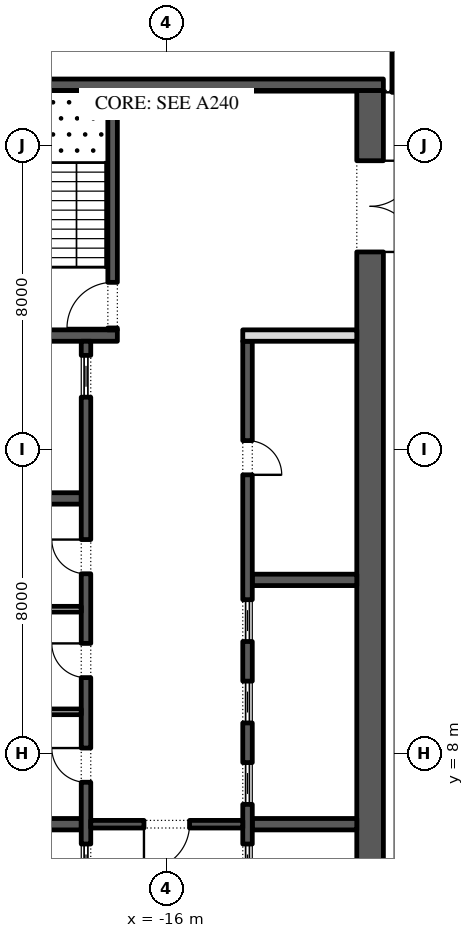
"""IFC4 building model, lengths in metres.
Left out: names, types, materials, properties, quantities, classifications, styles, units other than length and angle.
Written with IfcOpenShell. Run it as: python <this file> out.ifc"""

import sys

from ifc_helpers import new_model, si_unit, direction, frame, frame_2d, origin, place, context, subcontext, project, spatial, rectangle, extrude, element, fill, save


model = new_model("IFC4")
c1 = context("Model", 3, precision=1e-05, world=origin(), true_north=direction((0.0, 1.0)))
c2 = subcontext(c1, "Body", "Model", "MODEL_VIEW")
j1 = project(units=[si_unit("LENGTHUNIT", "METRE"), si_unit("PLANEANGLEUNIT", "RADIAN")], contexts=[c1])
p1 = place(None, origin())
s1 = spatial("IfcSite", under=j1, at=p1, CompositionType="ELEMENT")
p2 = place(p1, origin())
s2 = spatial("IfcBuilding", under=s1, at=p2, CompositionType="ELEMENT")
p3 = place(p2, frame((0.0, 0.0, 171.6)))
s3 = spatial("IfcBuildingStorey", under=s2, at=p3, CompositionType="ELEMENT", Elevation=171.6)
p4 = place(p3, frame((-10.65, -2.45, 0.0), z_axis=(0.0, 0.0, 1.0), x_axis=(0.0, 1.0, 0.0)))
e1 = element("IfcWall", 1, at=p4, inside=s3, PredefinedType="SHEAR", context=c2, shape_type="SweptSolid", body=[
    extrude(rectangle(XDim=27.9, YDim=0.7, at=frame_2d((13.95, 0.0))), origin(), (0.0, 0.0, 1.0), 4.0),
])
p5 = place(p4, frame((23.65, 0.0, 0.0)))
e2 = element("IfcOpeningElement", 2, at=p5, cuts=e1, PredefinedType="OPENING", context=c2, shape_type="SweptSolid", body=[
    extrude(rectangle(XDim=2.4, YDim=2.1, at=frame_2d((1.2, 1.05))), frame((0.0, 0.36, 0.0), z_axis=(0.0, -1.0, 0.0), x_axis=(1.0, 0.0, 0.0)), (0.0, 0.0, 1.0), 0.72),
])
p6 = place(p4, frame((1.387, 0.0, 0.0)))
e3 = element("IfcOpeningElement", 3, at=p6, cuts=e1, PredefinedType="OPENING", context=c2, shape_type="SweptSolid", body=[
    extrude(rectangle(XDim=0.9, YDim=2.1, at=frame_2d((0.45, 1.05))), frame((0.0, 0.36, 0.0), z_axis=(0.0, -1.0, 0.0), x_axis=(1.0, 0.0, 0.0)), (0.0, 0.0, 1.0), 0.72),
])
p7 = place(p4, frame((4.562, 0.0, 0.0)))
e4 = element("IfcOpeningElement", 4, at=p7, cuts=e1, PredefinedType="OPENING", context=c2, shape_type="SweptSolid", body=[
    extrude(rectangle(XDim=1.0, YDim=2.1, at=frame_2d((0.5, 1.05))), frame((0.0, 0.36, 0.0), z_axis=(0.0, -1.0, 0.0), x_axis=(1.0, 0.0, 0.0)), (0.0, 0.0, 1.0), 0.72),
])
p8 = place(p3, frame((-21.7, 25.6, 0.0), z_axis=(0.0, 0.0, 1.0), x_axis=(1.0, 0.0, 0.0)))
e5 = element("IfcWall", 5, at=p8, inside=s3, PredefinedType="SHEAR", context=c2, shape_type="SweptSolid", body=[
    extrude(rectangle(XDim=11.4, YDim=0.3, at=frame_2d((5.7, 0.0))), origin(), (0.0, 0.0, 1.0), 4.0),
])
p9 = place(p3, frame((-21.0, 19.0, 0.0), z_axis=(0.0, 0.0, 1.0), x_axis=(1.0, 0.0, 0.0)))
e6 = element("IfcWall", 6, at=p9, inside=s3, PredefinedType="SHEAR", context=c2, shape_type="SweptSolid", body=[
    extrude(rectangle(XDim=3.7, YDim=0.3, at=frame_2d((1.85, 0.0))), origin(), (0.0, 0.0, 1.0), 4.0),
])
p10 = place(p3, frame((-17.425, 19.15, 0.0), z_axis=(0.0, 0.0, 1.0), x_axis=(0.0, 1.0, 0.0)))
e7 = element("IfcWall", 7, at=p10, inside=s3, PredefinedType="SHEAR", context=c2, shape_type="SweptSolid", body=[
    extrude(rectangle(XDim=6.3, YDim=0.25, at=frame_2d((3.15, 0.0))), origin(), (0.0, 0.0, 1.0), 4.0),
])
p11 = place(p10, frame((0.05, 0.0, 0.0)))
e8 = element("IfcOpeningElement", 8, at=p11, cuts=e7, PredefinedType="OPENING", context=c2, shape_type="SweptSolid", body=[
    extrude(rectangle(XDim=1.2, YDim=2.1, at=frame_2d((0.6, 1.05))), frame((0.0, 0.135, 0.0), z_axis=(0.0, -1.0, 0.0), x_axis=(1.0, 0.0, 0.0)), (0.0, 0.0, 1.0), 0.27),
])
for number, where, z_axis, x_axis in (
    (9, (-21.0, 6.143, 0.0), (0.0, 0.0, 1.0), (1.0, 0.0, 0.0)),
    (10, (-21.0, 14.714, 0.0), (0.0, 0.0, 1.0), (1.0, 0.0, 0.0)),
):
    element("IfcWall", number, at=place(p3, frame(where, z_axis=z_axis, x_axis=x_axis)), inside=s3, PredefinedType="SHEAR", context=c2, shape_type="SweptSolid", body=[
        extrude(rectangle(XDim=2.75, YDim=0.3, at=frame_2d((1.375, 0.0))), origin(), (0.0, 0.0, 1.0), 4.0),
    ])
p12 = place(p3, frame((-18.125, 4.15, 0.0), z_axis=(0.0, 0.0, 1.0), x_axis=(0.0, 1.0, 0.0)))
e11 = element("IfcWall", 11, at=p12, inside=s3, PredefinedType="SHEAR", context=c2, shape_type="SweptSolid", body=[
    extrude(rectangle(XDim=14.7, YDim=0.25, at=frame_2d((7.35, 0.0))), origin(), (0.0, 0.0, 1.0), 4.0),
])
p13 = place(p12, frame((3.096, 0.0, 0.0)))
e12 = element("IfcOpeningElement", 12, at=p13, cuts=e11, PredefinedType="OPENING", context=c2, shape_type="SweptSolid", body=[
    extrude(rectangle(XDim=0.9, YDim=2.1, at=frame_2d((0.45, 1.05))), frame((0.0, 0.135, 0.0), z_axis=(0.0, -1.0, 0.0), x_axis=(1.0, 0.0, 0.0)), (0.0, 0.0, 1.0), 0.27),
])
p14 = place(p12, frame((5.85, 0.0, 0.0)))
e13 = element("IfcOpeningElement", 13, at=p14, cuts=e11, PredefinedType="OPENING", context=c2, shape_type="SweptSolid", body=[
    extrude(rectangle(XDim=0.9, YDim=2.1, at=frame_2d((0.45, 1.05))), frame((0.0, 0.135, 0.0), z_axis=(0.0, -1.0, 0.0), x_axis=(1.0, 0.0, 0.0)), (0.0, 0.0, 1.0), 0.27),
])
p15 = place(p12, frame((8.582, 0.0, 0.0)))
e14 = element("IfcOpeningElement", 14, at=p15, cuts=e11, PredefinedType="OPENING", context=c2, shape_type="SweptSolid", body=[
    extrude(rectangle(XDim=0.9, YDim=2.1, at=frame_2d((0.45, 1.05))), frame((0.0, 0.135, 0.0), z_axis=(0.0, -1.0, 0.0), x_axis=(1.0, 0.0, 0.0)), (0.0, 0.0, 1.0), 0.27),
])
p16 = place(p12, frame((0.371, 0.0, 0.0)))
e15 = element("IfcOpeningElement", 15, at=p16, cuts=e11, PredefinedType="OPENING", context=c2, shape_type="SweptSolid", body=[
    extrude(rectangle(XDim=1.1, YDim=2.1, at=frame_2d((0.55, 1.05))), frame((0.0, 0.135, 0.0), z_axis=(0.0, -1.0, 0.0), x_axis=(1.0, 0.0, 0.0)), (0.0, 0.0, 1.0), 0.27),
])
p17 = place(p12, frame((13.229, 0.0, 0.0)))
e16 = element("IfcOpeningElement", 16, at=p17, cuts=e11, PredefinedType="OPENING", context=c2, shape_type="SweptSolid", body=[
    extrude(rectangle(XDim=1.1, YDim=2.1, at=frame_2d((0.55, 1.05))), frame((0.0, 0.135, 0.0), z_axis=(0.0, -1.0, 0.0), x_axis=(1.0, 0.0, 0.0)), (0.0, 0.0, 1.0), 0.27),
])
for number, where, z_axis, x_axis in (
    (17, (-21.0, 9.1, 0.0), (0.0, 0.0, 1.0), (1.0, 0.0, 0.0)),
    (18, (-21.0, 11.8, 0.0), (0.0, 0.0, 1.0), (1.0, 0.0, 0.0)),
):
    element("IfcWall", number, at=place(p3, frame(where, z_axis=z_axis, x_axis=x_axis)), inside=s3, PredefinedType="PARTITIONING", context=c2, shape_type="SweptSolid", body=[
        extrude(rectangle(XDim=2.75, YDim=0.15, at=frame_2d((1.375, 0.0))), origin(), (0.0, 0.0, 1.0), 4.0),
    ])
for number, where, z_axis, x_axis in (
    (19, (-13.75, 6.143, 0.0), (0.0, 0.0, 1.0), (1.0, 0.0, 0.0)),
    (20, (-13.75, 12.571, 0.0), (0.0, 0.0, 1.0), (1.0, 0.0, 0.0)),
):
    element("IfcWall", number, at=place(p3, frame(where, z_axis=z_axis, x_axis=x_axis)), inside=s3, PredefinedType="SHEAR", context=c2, shape_type="SweptSolid", body=[
        extrude(rectangle(XDim=2.75, YDim=0.3, at=frame_2d((1.375, 0.0))), origin(), (0.0, 0.0, 1.0), 4.0),
    ])
p18 = place(p3, frame((-13.875, -2.45, 0.0), z_axis=(0.0, 0.0, 1.0), x_axis=(0.0, 1.0, 0.0)))
e21 = element("IfcWall", 21, at=p18, inside=s3, PredefinedType="SHEAR", context=c2, shape_type="SweptSolid", body=[
    extrude(rectangle(XDim=21.3, YDim=0.25, at=frame_2d((10.65, 0.0))), origin(), (0.0, 0.0, 1.0), 4.0),
])
p19 = place(p18, frame((17.786, 0.0, 0.0)))
e22 = element("IfcOpeningElement", 22, at=p19, cuts=e21, PredefinedType="OPENING", context=c2, shape_type="SweptSolid", body=[
    extrude(rectangle(XDim=0.9, YDim=2.1, at=frame_2d((0.45, 1.05))), frame((0.0, 0.135, 0.0), z_axis=(0.0, -1.0, 0.0), x_axis=(1.0, 0.0, 0.0)), (0.0, 0.0, 1.0), 0.27),
])
p20 = place(p18, frame((6.971, 0.0, 0.0)))
e23 = element("IfcOpeningElement", 23, at=p20, cuts=e21, PredefinedType="OPENING", context=c2, shape_type="SweptSolid", body=[
    extrude(rectangle(XDim=1.1, YDim=2.1, at=frame_2d((0.55, 1.05))), frame((0.0, 0.135, 0.0), z_axis=(0.0, -1.0, 0.0), x_axis=(1.0, 0.0, 0.0)), (0.0, 0.0, 1.0), 0.27),
])
p21 = place(p18, frame((9.114, 0.0, 0.0)))
e24 = element("IfcOpeningElement", 24, at=p21, cuts=e21, PredefinedType="OPENING", context=c2, shape_type="SweptSolid", body=[
    extrude(rectangle(XDim=1.1, YDim=2.1, at=frame_2d((0.55, 1.05))), frame((0.0, 0.135, 0.0), z_axis=(0.0, -1.0, 0.0), x_axis=(1.0, 0.0, 0.0)), (0.0, 0.0, 1.0), 0.27),
])
p22 = place(p18, frame((11.257, 0.0, 0.0)))
e25 = element("IfcOpeningElement", 25, at=p22, cuts=e21, PredefinedType="OPENING", context=c2, shape_type="SweptSolid", body=[
    extrude(rectangle(XDim=1.1, YDim=2.1, at=frame_2d((0.55, 1.05))), frame((0.0, 0.135, 0.0), z_axis=(0.0, -1.0, 0.0), x_axis=(1.0, 0.0, 0.0)), (0.0, 0.0, 1.0), 0.27),
])
p23 = place(p18, frame((13.4, 0.0, 0.0)))
e26 = element("IfcOpeningElement", 26, at=p23, cuts=e21, PredefinedType="OPENING", context=c2, shape_type="SweptSolid", body=[
    extrude(rectangle(XDim=1.1, YDim=2.1, at=frame_2d((0.55, 1.05))), frame((0.0, 0.135, 0.0), z_axis=(0.0, -1.0, 0.0), x_axis=(1.0, 0.0, 0.0)), (0.0, 0.0, 1.0), 0.27),
])
p24 = place(p3, frame((-14.0, 19.0, 0.0), z_axis=(0.0, 0.0, 1.0), x_axis=(1.0, 0.0, 0.0)))
e27 = element("IfcWall", 27, at=p24, inside=s3, PredefinedType="PARTITIONING", context=c2, shape_type="SweptSolid", body=[
    extrude(rectangle(XDim=3.0, YDim=0.3, at=frame_2d((1.5, 0.0))), origin(), (0.0, 0.0, 1.0), 4.0),
])
p25 = place(p3, frame((-18.0, 6.143, 0.0), z_axis=(0.0, 0.0, 1.0), x_axis=(1.0, 0.0, 0.0)))
e28 = element("IfcWall", 28, at=p25, inside=s3, PredefinedType="SHEAR", context=c2, shape_type="SweptSolid", body=[
    extrude(rectangle(XDim=4.0, YDim=0.2, at=frame_2d((2.0, 0.0))), origin(), (0.0, 0.0, 1.0), 4.0),
])
p26 = place(p25, frame((1.4, 0.0, 0.0)))
e29 = element("IfcOpeningElement", 29, at=p26, cuts=e28, PredefinedType="OPENING", context=c2, shape_type="SweptSolid", body=[
    extrude(rectangle(XDim=1.2, YDim=2.1, at=frame_2d((0.6, 1.05))), frame((0.0, 0.11, 0.0), z_axis=(0.0, -1.0, 0.0), x_axis=(1.0, 0.0, 0.0)), (0.0, 0.0, 1.0), 0.22),
])
p27 = place(p3, frame((-10.0, 25.4, 0.0), z_axis=(0.0, 0.0, 1.0), x_axis=(0.0, 1.0, 0.0)))
e30 = element("IfcWall", 30, at=p27, inside=s3, PredefinedType="PARTITIONING", context=c2, shape_type="SweptSolid", body=[
    extrude(rectangle(XDim=2.0, YDim=0.15, at=frame_2d((1.0, 0.0))), origin(), (0.0, 0.0, 1.0), 4.0),
])
p28 = place(p13, origin())
e31 = element("IfcDoor", 31, at=p28, inside=s3, OperationType="SINGLE_SWING_LEFT", PredefinedType="DOOR", context=c2, shape_type="SweptSolid", body=[
    extrude(rectangle(XDim=0.9, YDim=2.1, at=frame_2d((0.45, 1.05))), frame((0.0, 0.125, 0.0), z_axis=(0.0, -1.0, 0.0), x_axis=(1.0, 0.0, 0.0)), (0.0, 0.0, 1.0), 0.05),
])
fill(e12, e31)
p29 = place(p14, origin())
e32 = element("IfcDoor", 32, at=p29, inside=s3, OperationType="SINGLE_SWING_LEFT", PredefinedType="DOOR", context=c2, shape_type="SweptSolid", body=[
    extrude(rectangle(XDim=0.9, YDim=2.1, at=frame_2d((0.45, 1.05))), frame((0.0, 0.125, 0.0), z_axis=(0.0, -1.0, 0.0), x_axis=(1.0, 0.0, 0.0)), (0.0, 0.0, 1.0), 0.05),
])
fill(e13, e32)
p30 = place(p15, origin())
e33 = element("IfcDoor", 33, at=p30, inside=s3, OperationType="SINGLE_SWING_LEFT", PredefinedType="DOOR", context=c2, shape_type="SweptSolid", body=[
    extrude(rectangle(XDim=0.9, YDim=2.1, at=frame_2d((0.45, 1.05))), frame((0.0, 0.125, 0.0), z_axis=(0.0, -1.0, 0.0), x_axis=(1.0, 0.0, 0.0)), (0.0, 0.0, 1.0), 0.05),
])
fill(e14, e33)
p31 = place(p16, origin())
e34 = element("IfcDoor", 34, at=p31, inside=s3, OperationType="SLIDING_TO_LEFT", PredefinedType="DOOR", context=c2, shape_type="SweptSolid", body=[
    extrude(rectangle(XDim=1.1, YDim=2.1, at=frame_2d((0.55, 1.05))), frame((0.0, 0.025, 0.0), z_axis=(0.0, -1.0, 0.0), x_axis=(1.0, 0.0, 0.0)), (0.0, 0.0, 1.0), 0.05),
])
fill(e15, e34)
p32 = place(p17, origin())
e35 = element("IfcDoor", 35, at=p32, inside=s3, OperationType="SLIDING_TO_LEFT", PredefinedType="DOOR", context=c2, shape_type="SweptSolid", body=[
    extrude(rectangle(XDim=1.1, YDim=2.1, at=frame_2d((0.55, 1.05))), frame((0.0, 0.025, 0.0), z_axis=(0.0, -1.0, 0.0), x_axis=(1.0, 0.0, 0.0)), (0.0, 0.0, 1.0), 0.05),
])
fill(e16, e35)
p33 = place(p19, frame((0.9, -0.2, 0.0), z_axis=(0.0, 0.0, 1.0), x_axis=(-1.0, 0.0, 0.0)))
e36 = element("IfcDoor", 36, at=p33, inside=s3, OperationType="SINGLE_SWING_LEFT", PredefinedType="DOOR", context=c2, shape_type="SweptSolid", body=[
    extrude(rectangle(XDim=0.9, YDim=2.1, at=frame_2d((0.45, 1.05))), frame((0.0, -0.075, 0.0), z_axis=(0.0, -1.0, 0.0), x_axis=(1.0, 0.0, 0.0)), (0.0, 0.0, 1.0), 0.05),
])
fill(e22, e36)
p34 = place(p20, origin())
e37 = element("IfcDoor", 37, at=p34, inside=s3, OperationType="SLIDING_TO_LEFT", PredefinedType="DOOR", context=c2, shape_type="SweptSolid", body=[
    extrude(rectangle(XDim=1.1, YDim=2.1, at=frame_2d((0.55, 1.05))), frame((0.0, 0.025, 0.0), z_axis=(0.0, -1.0, 0.0), x_axis=(1.0, 0.0, 0.0)), (0.0, 0.0, 1.0), 0.05),
])
fill(e23, e37)
p35 = place(p21, origin())
e38 = element("IfcDoor", 38, at=p35, inside=s3, OperationType="SLIDING_TO_LEFT", PredefinedType="DOOR", context=c2, shape_type="SweptSolid", body=[
    extrude(rectangle(XDim=1.1, YDim=2.1, at=frame_2d((0.55, 1.05))), frame((0.0, 0.025, 0.0), z_axis=(0.0, -1.0, 0.0), x_axis=(1.0, 0.0, 0.0)), (0.0, 0.0, 1.0), 0.05),
])
fill(e24, e38)
p36 = place(p22, origin())
e39 = element("IfcDoor", 39, at=p36, inside=s3, OperationType="SLIDING_TO_LEFT", PredefinedType="DOOR", context=c2, shape_type="SweptSolid", body=[
    extrude(rectangle(XDim=1.1, YDim=2.1, at=frame_2d((0.55, 1.05))), frame((0.0, 0.025, 0.0), z_axis=(0.0, -1.0, 0.0), x_axis=(1.0, 0.0, 0.0)), (0.0, 0.0, 1.0), 0.05),
])
fill(e25, e39)
p37 = place(p23, origin())
e40 = element("IfcDoor", 40, at=p37, inside=s3, OperationType="SLIDING_TO_LEFT", PredefinedType="DOOR", context=c2, shape_type="SweptSolid", body=[
    extrude(rectangle(XDim=1.1, YDim=2.1, at=frame_2d((0.55, 1.05))), frame((0.0, 0.025, 0.0), z_axis=(0.0, -1.0, 0.0), x_axis=(1.0, 0.0, 0.0)), (0.0, 0.0, 1.0), 0.05),
])
fill(e26, e40)
p38 = place(p26, frame((1.2, 0.0, 0.0), z_axis=(0.0, 0.0, 1.0), x_axis=(-1.0, 0.0, 0.0)))
e41 = element("IfcDoor", 41, at=p38, inside=s3, OperationType="SINGLE_SWING_LEFT", PredefinedType="DOOR", context=c2, shape_type="SweptSolid", body=[
    extrude(rectangle(XDim=1.2, YDim=2.1, at=frame_2d((0.6, 1.05))), frame((0.0, 0.025, 0.0), z_axis=(0.0, -1.0, 0.0), x_axis=(1.0, 0.0, 0.0)), (0.0, 0.0, 1.0), 0.05),
])
fill(e29, e41)
p39 = place(p5, frame((2.4, 0.0, 0.0), z_axis=(0.0, 0.0, 1.0), x_axis=(-1.0, 0.0, 0.0)))
e42 = element("IfcDoor", 42, at=p39, inside=s3, OperationType="DOUBLE_DOOR_SINGLE_SWING", PredefinedType="DOOR", context=c2, shape_type="SweptSolid", body=[
    extrude(rectangle(XDim=2.4, YDim=2.1, at=frame_2d((1.2, 1.05))), frame((0.0, 0.025, 0.0), z_axis=(0.0, -1.0, 0.0), x_axis=(1.0, 0.0, 0.0)), (0.0, 0.0, 1.0), 0.05),
])
fill(e2, e42)
p40 = place(p11, origin())
e43 = element("IfcDoor", 43, at=p40, inside=s3, OperationType="SINGLE_SWING_RIGHT", PredefinedType="DOOR", context=c2, shape_type="SweptSolid", body=[
    extrude(rectangle(XDim=1.2, YDim=2.1, at=frame_2d((0.6, 1.05))), frame((0.0, 0.025, 0.0), z_axis=(0.0, -1.0, 0.0), x_axis=(1.0, 0.0, 0.0)), (0.0, 0.0, 1.0), 0.05),
])
fill(e8, e43)
save(model, sys.argv[1])
